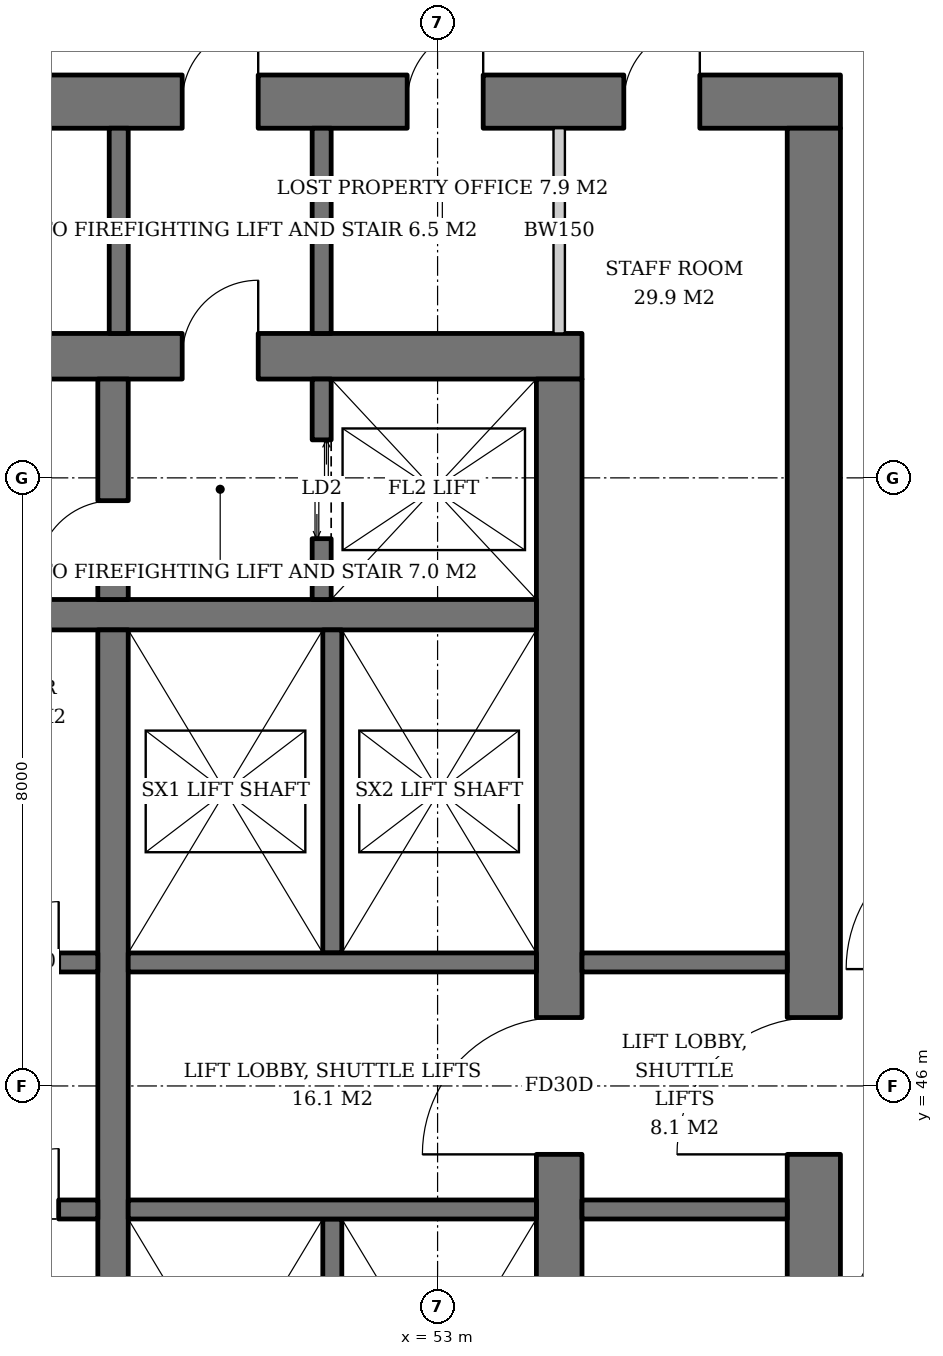
"""IFC4 building model, lengths in metres.
Left out: names, types, materials, properties, quantities, classifications, styles, units other than length and angle.
Written with IfcOpenShell. Run it as: python <this file> out.ifc"""

import sys

from ifc_helpers import new_model, si_unit, direction, frame, frame_2d, origin, place, context, subcontext, project, spatial, rectangle, extrude, element, fill, save


model = new_model("IFC4")
c1 = context("Model", 3, precision=1e-05, world=origin(), true_north=direction((0.0, 1.0)))
c2 = subcontext(c1, "Body", "Model", "MODEL_VIEW")
j1 = project(units=[si_unit("LENGTHUNIT", "METRE"), si_unit("PLANEANGLEUNIT", "RADIAN")], contexts=[c1])
p1 = place(None, origin())
s1 = spatial("IfcSite", under=j1, at=p1, CompositionType="ELEMENT")
p2 = place(p1, origin())
s2 = spatial("IfcBuilding", under=s1, at=p2, CompositionType="ELEMENT")
p3 = place(p2, frame((0.0, 0.0, 89.4)))
s3 = spatial("IfcBuildingStorey", under=s2, at=p3, CompositionType="ELEMENT", Elevation=89.4)
p4 = place(p3, frame((35.1, 55.6, 0.0), z_axis=(0.0, 0.0, 1.0), x_axis=(1.0, 0.0, 0.0)))
e1 = element("IfcWall", 1, at=p4, inside=s3, PredefinedType="SHEAR", context=c2, shape_type="SweptSolid", body=[
    extrude(rectangle(XDim=19.8, YDim=0.6, at=frame_2d((9.9, 0.0))), origin(), (0.0, 0.0, 1.0), 3.8),
])
p5 = place(p4, frame((14.54, 0.0, 0.0)))
e2 = element("IfcOpeningElement", 2, at=p5, cuts=e1, PredefinedType="OPENING", context=c2, shape_type="SweptSolid", body=[
    extrude(rectangle(XDim=1.0, YDim=2.1, at=frame_2d((0.5, 1.05))), frame((0.0, 0.31, 0.0), z_axis=(0.0, -1.0, 0.0), x_axis=(1.0, 0.0, 0.0)), (0.0, 0.0, 1.0), 0.62),
])
p6 = place(p4, frame((2.425, 0.0, 0.0)))
e3 = element("IfcOpeningElement", 3, at=p6, cuts=e1, PredefinedType="OPENING", context=c2, shape_type="SweptSolid", body=[
    extrude(rectangle(XDim=1.0, YDim=2.1, at=frame_2d((0.5, 1.05))), frame((0.0, 0.31, 0.0), z_axis=(0.0, -1.0, 0.0), x_axis=(1.0, 0.0, 0.0)), (0.0, 0.0, 1.0), 0.62),
])
p7 = place(p3, frame((54.6, 36.7, 0.0), z_axis=(0.0, 0.0, 1.0), x_axis=(0.0, 1.0, 0.0)))
e4 = element("IfcWall", 4, at=p7, inside=s3, PredefinedType="SHEAR", context=c2, shape_type="SweptSolid", body=[
    extrude(rectangle(XDim=18.6, YDim=0.6, at=frame_2d((9.3, 0.0))), origin(), (0.0, 0.0, 1.0), 3.8),
])
p8 = place(p7, frame((8.4, 0.0, 0.0)))
e5 = element("IfcOpeningElement", 5, at=p8, cuts=e4, PredefinedType="OPENING", context=c2, shape_type="SweptSolid", body=[
    extrude(rectangle(XDim=1.8, YDim=2.4, at=frame_2d((0.9, 1.2))), frame((0.0, 0.31, 0.0), z_axis=(0.0, -1.0, 0.0), x_axis=(1.0, 0.0, 0.0)), (0.0, 0.0, 1.0), 0.62),
])
p9 = place(p3, frame((31.7, 58.95, 0.0), z_axis=(0.0, 0.0, 1.0), x_axis=(1.0, 0.0, 0.0)))
e6 = element("IfcWall", 6, at=p9, inside=s3, PredefinedType="SHEAR", context=c2, shape_type="SweptSolid", body=[
    extrude(rectangle(XDim=26.6, YDim=0.7, at=frame_2d((13.3, 0.0))), origin(), (0.0, 0.0, 1.0), 3.8),
])
p10 = place(p9, frame((17.94, 0.0, 0.0)))
e7 = element("IfcOpeningElement", 7, at=p10, cuts=e6, PredefinedType="OPENING", context=c2, shape_type="SweptSolid", body=[
    extrude(rectangle(XDim=1.0, YDim=2.1, at=frame_2d((0.5, 1.05))), frame((0.0, 0.36, 0.0), z_axis=(0.0, -1.0, 0.0), x_axis=(1.0, 0.0, 0.0)), (0.0, 0.0, 1.0), 0.72),
])
p11 = place(p9, frame((5.825, 0.0, 0.0)))
e8 = element("IfcOpeningElement", 8, at=p11, cuts=e6, PredefinedType="OPENING", context=c2, shape_type="SweptSolid", body=[
    extrude(rectangle(XDim=1.0, YDim=2.1, at=frame_2d((0.5, 1.05))), frame((0.0, 0.36, 0.0), z_axis=(0.0, -1.0, 0.0), x_axis=(1.0, 0.0, 0.0)), (0.0, 0.0, 1.0), 0.72),
])
p12 = place(p9, frame((1.837, 0.0, 0.0)))
e9 = element("IfcOpeningElement", 9, at=p12, cuts=e6, PredefinedType="OPENING", context=c2, shape_type="SweptSolid", body=[
    extrude(rectangle(XDim=1.0, YDim=2.1, at=frame_2d((0.5, 1.05))), frame((0.0, 0.36, 0.0), z_axis=(0.0, -1.0, 0.0), x_axis=(1.0, 0.0, 0.0)), (0.0, 0.0, 1.0), 0.72),
])
p13 = place(p9, frame((3.781, 0.0, 0.0)))
e10 = element("IfcOpeningElement", 10, at=p13, cuts=e6, PredefinedType="OPENING", context=c2, shape_type="SweptSolid", body=[
    extrude(rectangle(XDim=1.0, YDim=2.1, at=frame_2d((0.5, 1.05))), frame((0.0, 0.36, 0.0), z_axis=(0.0, -1.0, 0.0), x_axis=(1.0, 0.0, 0.0)), (0.0, 0.0, 1.0), 0.72),
])
p14 = place(p9, frame((11.577, 0.0, 0.0)))
e11 = element("IfcOpeningElement", 11, at=p14, cuts=e6, PredefinedType="OPENING", context=c2, shape_type="SweptSolid", body=[
    extrude(rectangle(XDim=1.0, YDim=2.1, at=frame_2d((0.5, 1.05))), frame((0.0, 0.36, 0.0), z_axis=(0.0, -1.0, 0.0), x_axis=(1.0, 0.0, 0.0)), (0.0, 0.0, 1.0), 0.72),
])
p15 = place(p9, frame((20.9, 0.0, 0.0)))
e12 = element("IfcOpeningElement", 12, at=p15, cuts=e6, PredefinedType="OPENING", context=c2, shape_type="SweptSolid", body=[
    extrude(rectangle(XDim=1.0, YDim=2.1, at=frame_2d((0.5, 1.05))), frame((0.0, 0.36, 0.0), z_axis=(0.0, -1.0, 0.0), x_axis=(1.0, 0.0, 0.0)), (0.0, 0.0, 1.0), 0.72),
])
p16 = place(p9, frame((23.75, 0.0, 0.0)))
e13 = element("IfcOpeningElement", 13, at=p16, cuts=e6, PredefinedType="OPENING", context=c2, shape_type="SweptSolid", body=[
    extrude(rectangle(XDim=1.0, YDim=2.1, at=frame_2d((0.5, 1.05))), frame((0.0, 0.36, 0.0), z_axis=(0.0, -1.0, 0.0), x_axis=(1.0, 0.0, 0.0)), (0.0, 0.0, 1.0), 0.72),
])
p17 = place(p3, frame((57.95, 33.4, 0.0), z_axis=(0.0, 0.0, 1.0), x_axis=(0.0, 1.0, 0.0)))
e14 = element("IfcWall", 14, at=p17, inside=s3, PredefinedType="SHEAR", context=c2, shape_type="SweptSolid", body=[
    extrude(rectangle(XDim=25.2, YDim=0.7, at=frame_2d((12.6, 0.0))), origin(), (0.0, 0.0, 1.0), 3.8),
])
p18 = place(p17, frame((11.7, 0.0, 0.0)))
e15 = element("IfcOpeningElement", 15, at=p18, cuts=e14, PredefinedType="OPENING", context=c2, shape_type="SweptSolid", body=[
    extrude(rectangle(XDim=1.8, YDim=2.4, at=frame_2d((0.9, 1.2))), frame((0.0, 0.36, 0.0), z_axis=(0.0, -1.0, 0.0), x_axis=(1.0, 0.0, 0.0)), (0.0, 0.0, 1.0), 0.72),
])
p19 = place(p3, frame((35.7, 52.2, 0.0), z_axis=(0.0, 0.0, 1.0), x_axis=(1.0, 0.0, 0.0)))
e16 = element("IfcWall", 16, at=p19, inside=s3, PredefinedType="SHEAR", context=c2, shape_type="SweptSolid", body=[
    extrude(rectangle(XDim=18.6, YDim=0.4, at=frame_2d((9.3, 0.0))), origin(), (0.0, 0.0, 1.0), 3.8),
])
p20 = place(p3, frame((48.73, 40.0, 0.0), z_axis=(0.0, 0.0, 1.0), x_axis=(0.0, 1.0, 0.0)))
e17 = element("IfcWall", 17, at=p20, inside=s3, PredefinedType="SHEAR", context=c2, shape_type="SweptSolid", body=[
    extrude(rectangle(XDim=12.0, YDim=0.4, at=frame_2d((6.0, 0.0))), origin(), (0.0, 0.0, 1.0), 3.8),
])
p21 = place(p3, frame((48.73, 52.4, 0.0), z_axis=(0.0, 0.0, 1.0), x_axis=(0.0, 1.0, 0.0)))
e18 = element("IfcWall", 18, at=p21, inside=s3, PredefinedType="SHEAR", context=c2, shape_type="SweptSolid", body=[
    extrude(rectangle(XDim=2.9, YDim=0.4, at=frame_2d((1.45, 0.0))), origin(), (0.0, 0.0, 1.0), 3.8),
])
p22 = place(p21, frame((0.3, 0.0, 0.0)))
e19 = element("IfcOpeningElement", 19, at=p22, cuts=e18, PredefinedType="OPENING", context=c2, shape_type="SweptSolid", body=[
    extrude(rectangle(XDim=1.0, YDim=2.1, at=frame_2d((0.5, 1.05))), frame((0.0, 0.21, 0.0), z_axis=(0.0, -1.0, 0.0), x_axis=(1.0, 0.0, 0.0)), (0.0, 0.0, 1.0), 0.42),
])
p23 = place(p3, frame((51.475, 52.4, 0.0), z_axis=(0.0, 0.0, 1.0), x_axis=(0.0, 1.0, 0.0)))
e20 = element("IfcWall", 20, at=p23, inside=s3, PredefinedType="SHEAR", context=c2, shape_type="SweptSolid", body=[
    extrude(rectangle(XDim=2.9, YDim=0.25, at=frame_2d((1.45, 0.0))), origin(), (0.0, 0.0, 1.0), 3.8),
])
p24 = place(p23, frame((0.8, 0.0, 0.0)))
e21 = element("IfcOpeningElement", 21, at=p24, cuts=e20, PredefinedType="OPENING", context=c2, shape_type="SweptSolid", body=[
    extrude(rectangle(XDim=1.3, YDim=2.2, at=frame_2d((0.65, 1.1))), frame((0.0, 0.135, 0.0), z_axis=(0.0, -1.0, 0.0), x_axis=(1.0, 0.0, 0.0)), (0.0, 0.0, 1.0), 0.27),
])
p25 = place(p3, frame((35.7, 47.625, 0.0), z_axis=(0.0, 0.0, 1.0), x_axis=(1.0, 0.0, 0.0)))
e22 = element("IfcWall", 22, at=p25, inside=s3, PredefinedType="SHEAR", context=c2, shape_type="SweptSolid", body=[
    extrude(rectangle(XDim=12.83, YDim=0.25, at=frame_2d((6.415, 0.0))), origin(), (0.0, 0.0, 1.0), 3.8),
])
p26 = place(p25, frame((0.7, 0.0, 0.0)))
e23 = element("IfcOpeningElement", 23, at=p26, cuts=e22, PredefinedType="OPENING", context=c2, shape_type="SweptSolid", body=[
    extrude(rectangle(XDim=1.1, YDim=2.2, at=frame_2d((0.55, 1.1))), frame((0.0, 0.135, 0.0), z_axis=(0.0, -1.0, 0.0), x_axis=(1.0, 0.0, 0.0)), (0.0, 0.0, 1.0), 0.27),
])
p27 = place(p25, frame((3.45, 0.0, 0.0)))
e24 = element("IfcOpeningElement", 24, at=p27, cuts=e22, PredefinedType="OPENING", context=c2, shape_type="SweptSolid", body=[
    extrude(rectangle(XDim=1.1, YDim=2.2, at=frame_2d((0.55, 1.1))), frame((0.0, 0.135, 0.0), z_axis=(0.0, -1.0, 0.0), x_axis=(1.0, 0.0, 0.0)), (0.0, 0.0, 1.0), 0.27),
])
p28 = place(p25, frame((6.2, 0.0, 0.0)))
e25 = element("IfcOpeningElement", 25, at=p28, cuts=e22, PredefinedType="OPENING", context=c2, shape_type="SweptSolid", body=[
    extrude(rectangle(XDim=1.1, YDim=2.2, at=frame_2d((0.55, 1.1))), frame((0.0, 0.135, 0.0), z_axis=(0.0, -1.0, 0.0), x_axis=(1.0, 0.0, 0.0)), (0.0, 0.0, 1.0), 0.27),
])
p29 = place(p25, frame((8.95, 0.0, 0.0)))
e26 = element("IfcOpeningElement", 26, at=p29, cuts=e22, PredefinedType="OPENING", context=c2, shape_type="SweptSolid", body=[
    extrude(rectangle(XDim=1.1, YDim=2.2, at=frame_2d((0.55, 1.1))), frame((0.0, 0.135, 0.0), z_axis=(0.0, -1.0, 0.0), x_axis=(1.0, 0.0, 0.0)), (0.0, 0.0, 1.0), 0.27),
])
p30 = place(p25, frame((11.515, 0.0, 0.0)))
e27 = element("IfcOpeningElement", 27, at=p30, cuts=e22, PredefinedType="OPENING", context=c2, shape_type="SweptSolid", body=[
    extrude(rectangle(XDim=0.8, YDim=2.0, at=frame_2d((0.4, 1.0))), frame((0.0, 0.135, 0.0), z_axis=(0.0, -1.0, 0.0), x_axis=(1.0, 0.0, 0.0)), (0.0, 0.0, 1.0), 0.27),
])
p31 = place(p3, frame((35.7, 44.375, 0.0), z_axis=(0.0, 0.0, 1.0), x_axis=(1.0, 0.0, 0.0)))
e28 = element("IfcWall", 28, at=p31, inside=s3, PredefinedType="SHEAR", context=c2, shape_type="SweptSolid", body=[
    extrude(rectangle(XDim=12.83, YDim=0.25, at=frame_2d((6.415, 0.0))), origin(), (0.0, 0.0, 1.0), 3.8),
])
p32 = place(p31, frame((0.7, 0.0, 0.0)))
e29 = element("IfcOpeningElement", 29, at=p32, cuts=e28, PredefinedType="OPENING", context=c2, shape_type="SweptSolid", body=[
    extrude(rectangle(XDim=1.1, YDim=2.2, at=frame_2d((0.55, 1.1))), frame((0.0, 0.135, 0.0), z_axis=(0.0, -1.0, 0.0), x_axis=(1.0, 0.0, 0.0)), (0.0, 0.0, 1.0), 0.27),
])
p33 = place(p31, frame((3.45, 0.0, 0.0)))
e30 = element("IfcOpeningElement", 30, at=p33, cuts=e28, PredefinedType="OPENING", context=c2, shape_type="SweptSolid", body=[
    extrude(rectangle(XDim=1.1, YDim=2.2, at=frame_2d((0.55, 1.1))), frame((0.0, 0.135, 0.0), z_axis=(0.0, -1.0, 0.0), x_axis=(1.0, 0.0, 0.0)), (0.0, 0.0, 1.0), 0.27),
])
p34 = place(p31, frame((6.2, 0.0, 0.0)))
e31 = element("IfcOpeningElement", 31, at=p34, cuts=e28, PredefinedType="OPENING", context=c2, shape_type="SweptSolid", body=[
    extrude(rectangle(XDim=1.1, YDim=2.2, at=frame_2d((0.55, 1.1))), frame((0.0, 0.135, 0.0), z_axis=(0.0, -1.0, 0.0), x_axis=(1.0, 0.0, 0.0)), (0.0, 0.0, 1.0), 0.27),
])
p35 = place(p31, frame((8.95, 0.0, 0.0)))
e32 = element("IfcOpeningElement", 32, at=p35, cuts=e28, PredefinedType="OPENING", context=c2, shape_type="SweptSolid", body=[
    extrude(rectangle(XDim=1.1, YDim=2.2, at=frame_2d((0.55, 1.1))), frame((0.0, 0.135, 0.0), z_axis=(0.0, -1.0, 0.0), x_axis=(1.0, 0.0, 0.0)), (0.0, 0.0, 1.0), 0.27),
])
p36 = place(p31, frame((11.515, 0.0, 0.0)))
e33 = element("IfcOpeningElement", 33, at=p36, cuts=e28, PredefinedType="OPENING", context=c2, shape_type="SweptSolid", body=[
    extrude(rectangle(XDim=0.8, YDim=2.0, at=frame_2d((0.4, 1.0))), frame((0.0, 0.135, 0.0), z_axis=(0.0, -1.0, 0.0), x_axis=(1.0, 0.0, 0.0)), (0.0, 0.0, 1.0), 0.27),
])
p37 = place(p3, frame((51.615, 47.75, 0.0), z_axis=(0.0, 0.0, 1.0), x_axis=(0.0, 1.0, 0.0)))
e34 = element("IfcWall", 34, at=p37, inside=s3, PredefinedType="SHEAR", context=c2, shape_type="SweptSolid", body=[
    extrude(rectangle(XDim=4.25, YDim=0.25, at=frame_2d((2.125, 0.0))), origin(), (0.0, 0.0, 1.0), 3.8),
])
p38 = place(p3, frame((48.93, 47.625, 0.0), z_axis=(0.0, 0.0, 1.0), x_axis=(1.0, 0.0, 0.0)))
e35 = element("IfcWall", 35, at=p38, inside=s3, PredefinedType="SHEAR", context=c2, shape_type="SweptSolid", body=[
    extrude(rectangle(XDim=5.37, YDim=0.25, at=frame_2d((2.685, 0.0))), origin(), (0.0, 0.0, 1.0), 3.8),
])
p39 = place(p3, frame((51.615, 44.25, 0.0), z_axis=(0.0, 0.0, 1.0), x_axis=(0.0, -1.0, 0.0)))
e36 = element("IfcWall", 36, at=p39, inside=s3, PredefinedType="SHEAR", context=c2, shape_type="SweptSolid", body=[
    extrude(rectangle(XDim=4.25, YDim=0.25, at=frame_2d((2.125, 0.0))), origin(), (0.0, 0.0, 1.0), 3.8),
])
p40 = place(p3, frame((48.93, 44.375, 0.0), z_axis=(0.0, 0.0, 1.0), x_axis=(1.0, 0.0, 0.0)))
e37 = element("IfcWall", 37, at=p40, inside=s3, PredefinedType="SHEAR", context=c2, shape_type="SweptSolid", body=[
    extrude(rectangle(XDim=5.37, YDim=0.25, at=frame_2d((2.685, 0.0))), origin(), (0.0, 0.0, 1.0), 3.8),
])
for number, where, z_axis, x_axis in (
    (38, (48.805, 55.9, 0.0), (0.0, 0.0, 1.0), (0.0, 1.0, 0.0)),
    (39, (51.475, 55.9, 0.0), (0.0, 0.0, 1.0), (0.0, 1.0, 0.0)),
    (40, (54.9, 44.375, 0.0), (0.0, 0.0, 1.0), (1.0, 0.0, 0.0)),
    (41, (54.9, 47.625, 0.0), (0.0, 0.0, 1.0), (1.0, 0.0, 0.0)),
):
    element("IfcWall", number, at=place(p3, frame(where, z_axis=z_axis, x_axis=x_axis)), inside=s3, PredefinedType="SOLIDWALL", context=c2, shape_type="SweptSolid", body=[
        extrude(rectangle(XDim=2.7, YDim=0.25, at=frame_2d((1.35, 0.0))), origin(), (0.0, 0.0, 1.0), 3.62),
    ])
p41 = place(p3, frame((54.6, 55.9, 0.0), z_axis=(0.0, 0.0, 1.0), x_axis=(0.0, 1.0, 0.0)))
e42 = element("IfcWall", 42, at=p41, inside=s3, PredefinedType="SOLIDWALL", context=c2, shape_type="SweptSolid", body=[
    extrude(rectangle(XDim=2.7, YDim=0.15, at=frame_2d((1.35, 0.0))), origin(), (0.0, 0.0, 1.0), 3.62),
])
p42 = place(p24, origin())
e43 = element("IfcDoor", 43, at=p42, inside=s3, OperationType="DOUBLE_DOOR_SLIDING", PredefinedType="DOOR", context=c2, shape_type="SweptSolid", body=[
    extrude(rectangle(XDim=1.3, YDim=2.2, at=frame_2d((0.65, 1.1))), frame((0.0, 0.025, 0.0), z_axis=(0.0, -1.0, 0.0), x_axis=(1.0, 0.0, 0.0)), (0.0, 0.0, 1.0), 0.05),
])
fill(e21, e43)
p43 = place(p30, origin())
e44 = element("IfcDoor", 44, at=p43, inside=s3, OperationType="SINGLE_SWING_RIGHT", PredefinedType="DOOR", context=c2, shape_type="SweptSolid", body=[
    extrude(rectangle(XDim=0.8, YDim=2.0, at=frame_2d((0.4, 1.0))), frame((0.0, 0.025, 0.0), z_axis=(0.0, -1.0, 0.0), x_axis=(1.0, 0.0, 0.0)), (0.0, 0.0, 1.0), 0.05),
])
fill(e27, e44)
p44 = place(p36, origin())
e45 = element("IfcDoor", 45, at=p44, inside=s3, OperationType="SINGLE_SWING_RIGHT", PredefinedType="DOOR", context=c2, shape_type="SweptSolid", body=[
    extrude(rectangle(XDim=0.8, YDim=2.0, at=frame_2d((0.4, 1.0))), frame((0.0, 0.025, 0.0), z_axis=(0.0, -1.0, 0.0), x_axis=(1.0, 0.0, 0.0)), (0.0, 0.0, 1.0), 0.05),
])
fill(e33, e45)
p45 = place(p22, origin())
e46 = element("IfcDoor", 46, at=p45, inside=s3, OperationType="SINGLE_SWING_LEFT", PredefinedType="DOOR", context=c2, shape_type="SweptSolid", body=[
    extrude(rectangle(XDim=1.0, YDim=2.1, at=frame_2d((0.5, 1.05))), frame((0.0, 0.025, 0.0), z_axis=(0.0, -1.0, 0.0), x_axis=(1.0, 0.0, 0.0)), (0.0, 0.0, 1.0), 0.05),
])
fill(e19, e46)
p46 = place(p5, origin())
e47 = element("IfcDoor", 47, at=p46, inside=s3, OperationType="SINGLE_SWING_RIGHT", PredefinedType="DOOR", context=c2, shape_type="SweptSolid", body=[
    extrude(rectangle(XDim=1.0, YDim=2.1, at=frame_2d((0.5, 1.05))), frame((0.0, 0.025, 0.0), z_axis=(0.0, -1.0, 0.0), x_axis=(1.0, 0.0, 0.0)), (0.0, 0.0, 1.0), 0.05),
])
fill(e2, e47)
p47 = place(p8, origin())
e48 = element("IfcDoor", 48, at=p47, inside=s3, OperationType="DOUBLE_DOOR_SINGLE_SWING", PredefinedType="DOOR", context=c2, shape_type="SweptSolid", body=[
    extrude(rectangle(XDim=1.8, YDim=2.4, at=frame_2d((0.9, 1.2))), frame((0.0, 0.025, 0.0), z_axis=(0.0, -1.0, 0.0), x_axis=(1.0, 0.0, 0.0)), (0.0, 0.0, 1.0), 0.05),
])
fill(e5, e48)
p48 = place(p18, origin())
e49 = element("IfcDoor", 49, at=p48, inside=s3, OperationType="DOUBLE_DOOR_SINGLE_SWING", PredefinedType="DOOR", context=c2, shape_type="SweptSolid", body=[
    extrude(rectangle(XDim=1.8, YDim=2.4, at=frame_2d((0.9, 1.2))), frame((0.0, 0.025, 0.0), z_axis=(0.0, -1.0, 0.0), x_axis=(1.0, 0.0, 0.0)), (0.0, 0.0, 1.0), 0.05),
])
fill(e15, e49)
p49 = place(p10, origin())
e50 = element("IfcDoor", 50, at=p49, inside=s3, OperationType="SINGLE_SWING_RIGHT", PredefinedType="DOOR", context=c2, shape_type="SweptSolid", body=[
    extrude(rectangle(XDim=1.0, YDim=2.1, at=frame_2d((0.5, 1.05))), frame((0.0, 0.025, 0.0), z_axis=(0.0, -1.0, 0.0), x_axis=(1.0, 0.0, 0.0)), (0.0, 0.0, 1.0), 0.05),
])
fill(e7, e50)
p50 = place(p15, origin())
e51 = element("IfcDoor", 51, at=p50, inside=s3, OperationType="SINGLE_SWING_RIGHT", PredefinedType="DOOR", context=c2, shape_type="SweptSolid", body=[
    extrude(rectangle(XDim=1.0, YDim=2.1, at=frame_2d((0.5, 1.05))), frame((0.0, -0.29, 0.0), z_axis=(0.0, -1.0, 0.0), x_axis=(1.0, 0.0, 0.0)), (0.0, 0.0, 1.0), 0.05),
])
fill(e12, e51)
p51 = place(p16, origin())
e52 = element("IfcDoor", 52, at=p51, inside=s3, OperationType="SINGLE_SWING_RIGHT", PredefinedType="DOOR", context=c2, shape_type="SweptSolid", body=[
    extrude(rectangle(XDim=1.0, YDim=2.1, at=frame_2d((0.5, 1.05))), frame((0.0, -0.29, 0.0), z_axis=(0.0, -1.0, 0.0), x_axis=(1.0, 0.0, 0.0)), (0.0, 0.0, 1.0), 0.05),
])
fill(e13, e52)
save(model, sys.argv[1])
